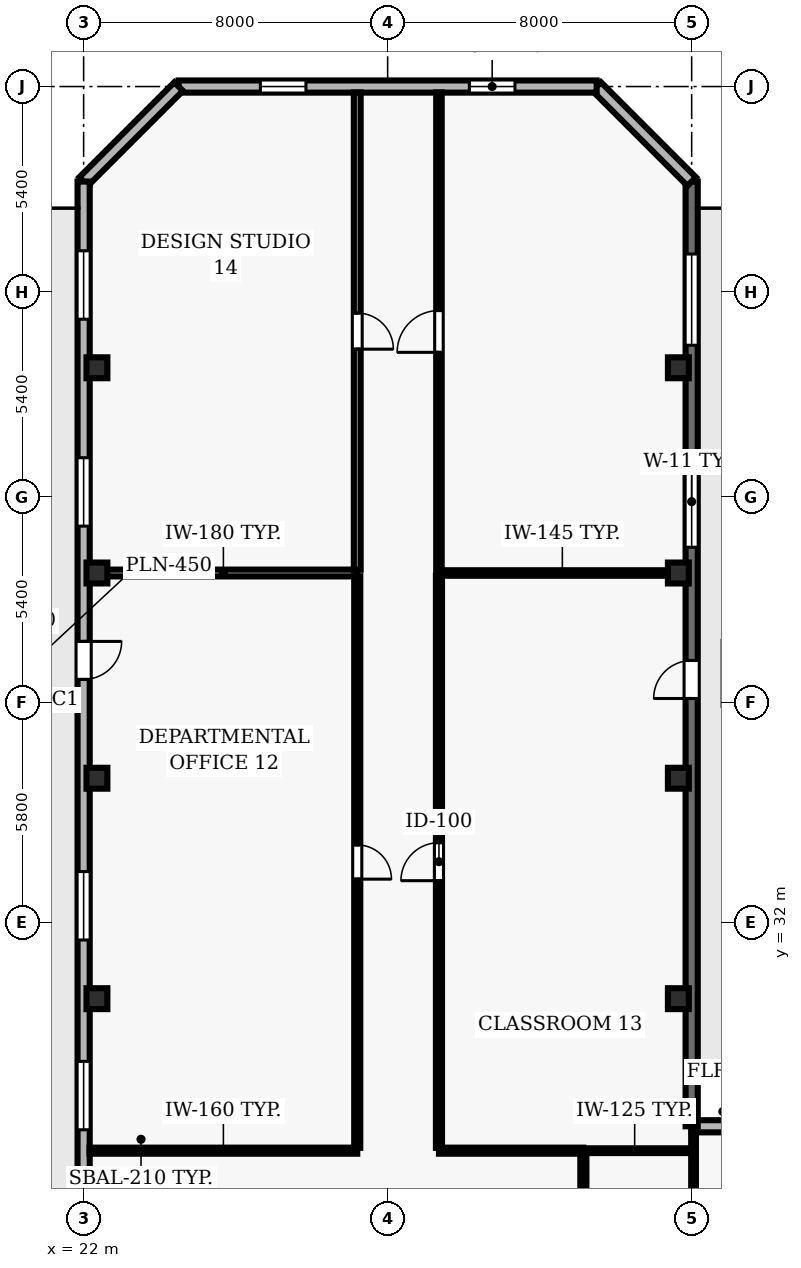
"""IFC4 building model, lengths in metres.
Left out: names, types, materials, properties, quantities, classifications, styles, units other than length and angle.
Written with IfcOpenShell. Run it as: python <this file> out.ifc"""

import sys

from ifc_helpers import new_model, si_unit, direction, frame, frame_2d, origin, origin_2d, place, context, subcontext, project, spatial, rectangle, hollow_rectangle, extrude, element, fill, save


model = new_model("IFC4")
c1 = context("Model", 3, precision=1e-05, world=origin(), true_north=direction((0.0, 1.0)))
c2 = subcontext(c1, "Body", "Model", "MODEL_VIEW")
j1 = project(units=[si_unit("LENGTHUNIT", "METRE"), si_unit("PLANEANGLEUNIT", "RADIAN")], contexts=[c1])
p1 = place(None, origin())
s1 = spatial("IfcSite", under=j1, at=p1, CompositionType="ELEMENT")
p2 = place(p1, origin())
s2 = spatial("IfcBuilding", under=s1, at=p2, CompositionType="ELEMENT")
p3 = place(p2, frame((0.0, 0.0, 62.2)))
s3 = spatial("IfcBuildingStorey", under=s2, at=p3, CompositionType="ELEMENT", Elevation=62.2)
for number, where, z_axis, x_axis in (
    (1, (22.35, 30.0, 0.0), (0.0, 0.0, 1.0), (1.0, 0.0, 0.0)),
    (2, (37.65, 30.0, 0.0), (0.0, 0.0, 1.0), (1.0, 0.0, 0.0)),
    (3, (22.35, 35.8, 0.0), (0.0, 0.0, 1.0), (1.0, 0.0, 0.0)),
    (4, (37.65, 35.8, 0.0), (0.0, 0.0, 1.0), (1.0, 0.0, 0.0)),
    (5, (22.35, 41.2, 0.0), (0.0, 0.0, 1.0), (1.0, 0.0, 0.0)),
    (6, (37.65, 41.2, 0.0), (0.0, 0.0, 1.0), (1.0, 0.0, 0.0)),
    (7, (22.35, 46.6, 0.0), (0.0, 0.0, 1.0), (1.0, 0.0, 0.0)),
    (8, (37.65, 46.6, 0.0), (0.0, 0.0, 1.0), (1.0, 0.0, 0.0)),
):
    element("IfcColumn", number, at=place(p3, frame(where, z_axis=z_axis, x_axis=x_axis)), inside=s3, PredefinedType="COLUMN", context=c2, shape_type="SweptSolid", body=[
        extrude(hollow_rectangle(XDim=0.55, YDim=0.55, WallThickness=0.025, at=origin_2d()), origin(), (0.0, 0.0, 1.0), 3.9),
    ])
p4 = place(p3, frame((49.95, 26.642, 0.0), z_axis=(0.0, 0.0, 1.0), x_axis=(-1.0, 0.0, 0.0)))
e9 = element("IfcWall", 9, at=p4, inside=s3, PredefinedType="SOLIDWALL", context=c2, shape_type="SweptSolid", body=[
    extrude(rectangle(XDim=11.95, YDim=0.32, at=frame_2d((5.975, 0.0))), origin(), (0.0, 0.0, 1.0), 3.69),
])
p5 = place(p4, frame((2.088, 0.0, 0.9)))
e10 = element("IfcOpeningElement", 10, at=p5, cuts=e9, PredefinedType="OPENING", context=c2, shape_type="SweptSolid", body=[
    extrude(rectangle(XDim=1.8, YDim=2.2, at=frame_2d((0.9, 1.1))), frame((0.0, 0.17, 0.0), z_axis=(0.0, -1.0, 0.0), x_axis=(1.0, 0.0, 0.0)), (0.0, 0.0, 1.0), 0.34),
])
p6 = place(p4, frame((8.063, 0.0, 0.9)))
e11 = element("IfcOpeningElement", 11, at=p6, cuts=e9, PredefinedType="OPENING", context=c2, shape_type="SweptSolid", body=[
    extrude(rectangle(XDim=1.8, YDim=2.2, at=frame_2d((0.9, 1.1))), frame((0.0, 0.17, 0.0), z_axis=(0.0, -1.0, 0.0), x_axis=(1.0, 0.0, 0.0)), (0.0, 0.0, 1.0), 0.34),
])
p7 = place(p3, frame((38.0, 26.642, 0.0), z_axis=(0.0, 0.0, 1.0), x_axis=(0.0, 1.0, 0.0)))
e12 = element("IfcWall", 12, at=p7, inside=s3, PredefinedType="SOLIDWALL", context=c2, shape_type="SweptSolid", body=[
    extrude(rectangle(XDim=24.858, YDim=0.32, at=frame_2d((12.429, 0.0))), origin(), (0.0, 0.0, 1.0), 3.69),
])
p8 = place(p7, frame((11.256, 0.0, 0.0)))
e13 = element("IfcOpeningElement", 13, at=p8, cuts=e12, PredefinedType="OPENING", context=c2, shape_type="SweptSolid", body=[
    extrude(rectangle(XDim=1.0, YDim=2.2, at=frame_2d((0.5, 1.1))), frame((0.0, 0.17, 0.0), z_axis=(0.0, -1.0, 0.0), x_axis=(1.0, 0.0, 0.0)), (0.0, 0.0, 1.0), 0.34),
])
p9 = place(p7, frame((15.236, 0.0, 0.9)))
e14 = element("IfcOpeningElement", 14, at=p9, cuts=e12, PredefinedType="OPENING", context=c2, shape_type="SweptSolid", body=[
    extrude(rectangle(XDim=2.4, YDim=2.2, at=frame_2d((1.2, 1.1))), frame((0.0, 0.17, 0.0), z_axis=(0.0, -1.0, 0.0), x_axis=(1.0, 0.0, 0.0)), (0.0, 0.0, 1.0), 0.34),
])
p10 = place(p7, frame((20.551, 0.0, 0.9)))
e15 = element("IfcOpeningElement", 15, at=p10, cuts=e12, PredefinedType="OPENING", context=c2, shape_type="SweptSolid", body=[
    extrude(rectangle(XDim=2.4, YDim=2.2, at=frame_2d((1.2, 1.1))), frame((0.0, 0.17, 0.0), z_axis=(0.0, -1.0, 0.0), x_axis=(1.0, 0.0, 0.0)), (0.0, 0.0, 1.0), 0.34),
])
p11 = place(p3, frame((38.0, 51.5, 0.0), z_axis=(0.0, 0.0, 1.0), x_axis=(-0.707106781187, 0.707106781187, 0.0)))
e16 = element("IfcWall", 16, at=p11, inside=s3, PredefinedType="SOLIDWALL", context=c2, shape_type="SweptSolid", body=[
    extrude(rectangle(XDim=3.536, YDim=0.32, at=frame_2d((1.768, 0.0))), origin(), (0.0, 0.0, 1.0), 3.69),
])
p12 = place(p3, frame((35.5, 54.0, 0.0), z_axis=(0.0, 0.0, 1.0), x_axis=(-1.0, 0.0, 0.0)))
e17 = element("IfcWall", 17, at=p12, inside=s3, PredefinedType="SOLIDWALL", context=c2, shape_type="SweptSolid", body=[
    extrude(rectangle(XDim=11.0, YDim=0.32, at=frame_2d((5.5, 0.0))), origin(), (0.0, 0.0, 1.0), 3.69),
])
p13 = place(p12, frame((2.15, 0.0, 0.9)))
e18 = element("IfcOpeningElement", 18, at=p13, cuts=e17, PredefinedType="OPENING", context=c2, shape_type="SweptSolid", body=[
    extrude(rectangle(XDim=1.2, YDim=1.6, at=frame_2d((0.6, 0.8))), frame((0.0, 0.17, 0.0), z_axis=(0.0, -1.0, 0.0), x_axis=(1.0, 0.0, 0.0)), (0.0, 0.0, 1.0), 0.34),
])
p14 = place(p12, frame((7.65, 0.0, 0.9)))
e19 = element("IfcOpeningElement", 19, at=p14, cuts=e17, PredefinedType="OPENING", context=c2, shape_type="SweptSolid", body=[
    extrude(rectangle(XDim=1.2, YDim=1.6, at=frame_2d((0.6, 0.8))), frame((0.0, 0.17, 0.0), z_axis=(0.0, -1.0, 0.0), x_axis=(1.0, 0.0, 0.0)), (0.0, 0.0, 1.0), 0.34),
])
p15 = place(p3, frame((24.5, 54.0, 0.0), z_axis=(0.0, 0.0, 1.0), x_axis=(-0.707106781187, -0.707106781187, 0.0)))
e20 = element("IfcWall", 20, at=p15, inside=s3, PredefinedType="SOLIDWALL", context=c2, shape_type="SweptSolid", body=[
    extrude(rectangle(XDim=3.536, YDim=0.32, at=frame_2d((1.768, 0.0))), origin(), (0.0, 0.0, 1.0), 3.69),
])
p16 = place(p3, frame((22.0, 51.5, 0.0), z_axis=(0.0, 0.0, 1.0), x_axis=(0.0, -1.0, 0.0)))
e21 = element("IfcWall", 21, at=p16, inside=s3, PredefinedType="SOLIDWALL", context=c2, shape_type="SweptSolid", body=[
    extrude(rectangle(XDim=49.0, YDim=0.32, at=frame_2d((24.5, 0.0))), origin(), (0.0, 0.0, 1.0), 3.69),
])
p17 = place(p16, frame((12.1, 0.0, 0.0)))
e22 = element("IfcOpeningElement", 22, at=p17, cuts=e21, PredefinedType="OPENING", context=c2, shape_type="SweptSolid", body=[
    extrude(rectangle(XDim=1.0, YDim=2.2, at=frame_2d((0.5, 1.1))), frame((0.0, 0.17, 0.0), z_axis=(0.0, -1.0, 0.0), x_axis=(1.0, 0.0, 0.0)), (0.0, 0.0, 1.0), 0.34),
])
p18 = place(p16, frame((1.822, 0.0, 0.9)))
e23 = element("IfcOpeningElement", 23, at=p18, cuts=e21, PredefinedType="OPENING", context=c2, shape_type="SweptSolid", body=[
    extrude(rectangle(XDim=1.8, YDim=1.6, at=frame_2d((0.9, 0.8))), frame((0.0, 0.17, 0.0), z_axis=(0.0, -1.0, 0.0), x_axis=(1.0, 0.0, 0.0)), (0.0, 0.0, 1.0), 0.34),
])
p19 = place(p16, frame((7.267, 0.0, 0.9)))
e24 = element("IfcOpeningElement", 24, at=p19, cuts=e21, PredefinedType="OPENING", context=c2, shape_type="SweptSolid", body=[
    extrude(rectangle(XDim=1.8, YDim=1.6, at=frame_2d((0.9, 0.8))), frame((0.0, 0.17, 0.0), z_axis=(0.0, -1.0, 0.0), x_axis=(1.0, 0.0, 0.0)), (0.0, 0.0, 1.0), 0.34),
])
p20 = place(p16, frame((18.156, 0.0, 0.9)))
e25 = element("IfcOpeningElement", 25, at=p20, cuts=e21, PredefinedType="OPENING", context=c2, shape_type="SweptSolid", body=[
    extrude(rectangle(XDim=1.8, YDim=1.6, at=frame_2d((0.9, 0.8))), frame((0.0, 0.17, 0.0), z_axis=(0.0, -1.0, 0.0), x_axis=(1.0, 0.0, 0.0)), (0.0, 0.0, 1.0), 0.34),
])
p21 = place(p16, frame((23.15, 0.0, 0.9)))
e26 = element("IfcOpeningElement", 26, at=p21, cuts=e21, PredefinedType="OPENING", context=c2, shape_type="SweptSolid", body=[
    extrude(rectangle(XDim=1.8, YDim=1.6, at=frame_2d((0.9, 0.8))), frame((0.0, 0.17, 0.0), z_axis=(0.0, -1.0, 0.0), x_axis=(1.0, 0.0, 0.0)), (0.0, 0.0, 1.0), 0.34),
])
p22 = place(p16, frame((29.044, 0.0, 0.9)))
e27 = element("IfcOpeningElement", 27, at=p22, cuts=e21, PredefinedType="OPENING", context=c2, shape_type="SweptSolid", body=[
    extrude(rectangle(XDim=1.8, YDim=1.6, at=frame_2d((0.9, 0.8))), frame((0.0, 0.17, 0.0), z_axis=(0.0, -1.0, 0.0), x_axis=(1.0, 0.0, 0.0)), (0.0, 0.0, 1.0), 0.34),
])
p23 = place(p16, frame((34.039, 0.0, 0.9)))
e28 = element("IfcOpeningElement", 28, at=p23, cuts=e21, PredefinedType="OPENING", context=c2, shape_type="SweptSolid", body=[
    extrude(rectangle(XDim=1.8, YDim=1.6, at=frame_2d((0.9, 0.8))), frame((0.0, 0.17, 0.0), z_axis=(0.0, -1.0, 0.0), x_axis=(1.0, 0.0, 0.0)), (0.0, 0.0, 1.0), 0.34),
])
p24 = place(p16, frame((39.933, 0.0, 0.9)))
e29 = element("IfcOpeningElement", 29, at=p24, cuts=e21, PredefinedType="OPENING", context=c2, shape_type="SweptSolid", body=[
    extrude(rectangle(XDim=1.8, YDim=1.6, at=frame_2d((0.9, 0.8))), frame((0.0, 0.17, 0.0), z_axis=(0.0, -1.0, 0.0), x_axis=(1.0, 0.0, 0.0)), (0.0, 0.0, 1.0), 0.34),
])
p25 = place(p3, frame((29.2, 26.0, 0.0), z_axis=(0.0, 0.0, 1.0), x_axis=(-1.0, 0.0, 0.0)))
e30 = element("IfcWall", 30, at=p25, inside=s3, PredefinedType="PARTITIONING", context=c2, shape_type="SweptSolid", body=[
    extrude(rectangle(XDim=7.045, YDim=0.16, at=frame_2d((3.522, 0.0))), origin(), (0.0, 0.0, 1.0), 3.69),
])
p26 = place(p3, frame((29.2, 41.2, 0.0), z_axis=(0.0, 0.0, 1.0), x_axis=(-1.0, 0.0, 0.0)))
e31 = element("IfcWall", 31, at=p26, inside=s3, PredefinedType="PARTITIONING", context=c2, shape_type="SweptSolid", body=[
    extrude(rectangle(XDim=7.045, YDim=0.18, at=frame_2d((3.522, 0.0))), origin(), (0.0, 0.0, 1.0), 2.995),
])
p27 = place(p3, frame((35.15, 26.0, 0.0), z_axis=(0.0, 0.0, 1.0), x_axis=(-1.0, 0.0, 0.0)))
e32 = element("IfcWall", 32, at=p27, inside=s3, PredefinedType="PARTITIONING", context=c2, shape_type="SweptSolid", body=[
    extrude(rectangle(XDim=3.8, YDim=0.16, at=frame_2d((1.9, 0.0))), origin(), (0.0, 0.0, 1.0), 3.69),
])
p28 = place(p3, frame((35.15, 26.0, 0.0), z_axis=(0.0, 0.0, 1.0), x_axis=(1.0, 0.0, 0.0)))
e33 = element("IfcWall", 33, at=p28, inside=s3, PredefinedType="PARTITIONING", context=c2, shape_type="SweptSolid", body=[
    extrude(rectangle(XDim=2.7, YDim=0.125, at=frame_2d((1.35, 0.0))), origin(), (0.0, 0.0, 1.0), 3.69),
])
p29 = place(p3, frame((37.845, 41.2, 0.0), z_axis=(0.0, 0.0, 1.0), x_axis=(-1.0, 0.0, 0.0)))
e34 = element("IfcWall", 34, at=p29, inside=s3, PredefinedType="PARTITIONING", context=c2, shape_type="SweptSolid", body=[
    extrude(rectangle(XDim=6.495, YDim=0.145, at=frame_2d((3.248, 0.0))), origin(), (0.0, 0.0, 1.0), 2.995),
])
p30 = place(p3, frame((29.2, 41.115, 0.0), z_axis=(0.0, 0.0, 1.0), x_axis=(0.0, -1.0, 0.0)))
e35 = element("IfcWall", 35, at=p30, inside=s3, PredefinedType="PARTITIONING", context=c2, shape_type="SweptSolid", body=[
    extrude(rectangle(XDim=15.04, YDim=0.16, at=frame_2d((7.52, 0.0))), origin(), (0.0, 0.0, 1.0), 3.69),
])
p31 = place(p30, frame((7.07, 0.0, 0.0)))
e36 = element("IfcOpeningElement", 36, at=p31, cuts=e35, PredefinedType="OPENING", context=c2, shape_type="SweptSolid", body=[
    extrude(rectangle(XDim=0.9, YDim=2.1, at=frame_2d((0.45, 1.05))), frame((0.0, 0.09, 0.0), z_axis=(0.0, -1.0, 0.0), x_axis=(1.0, 0.0, 0.0)), (0.0, 0.0, 1.0), 0.18),
])
p32 = place(p3, frame((29.2, 53.845, 0.0), z_axis=(0.0, 0.0, 1.0), x_axis=(0.0, -1.0, 0.0)))
e37 = element("IfcWall", 37, at=p32, inside=s3, PredefinedType="PARTITIONING", context=c2, shape_type="SweptSolid", body=[
    extrude(rectangle(XDim=12.56, YDim=0.18, at=frame_2d((6.28, 0.0))), origin(), (0.0, 0.0, 1.0), 3.69),
])
p33 = place(p32, frame((5.805, 0.0, 0.0)))
e38 = element("IfcOpeningElement", 38, at=p33, cuts=e37, PredefinedType="OPENING", context=c2, shape_type="SweptSolid", body=[
    extrude(rectangle(XDim=0.95, YDim=2.1, at=frame_2d((0.475, 1.05))), frame((0.0, 0.1, 0.0), z_axis=(0.0, -1.0, 0.0), x_axis=(1.0, 0.0, 0.0)), (0.0, 0.0, 1.0), 0.2),
])
p34 = place(p3, frame((31.35, 26.075, 0.0), z_axis=(0.0, 0.0, 1.0), x_axis=(0.0, 1.0, 0.0)))
e39 = element("IfcWall", 39, at=p34, inside=s3, PredefinedType="PARTITIONING", context=c2, shape_type="SweptSolid", body=[
    extrude(rectangle(XDim=15.058, YDim=0.16, at=frame_2d((7.529, 0.0))), origin(), (0.0, 0.0, 1.0), 3.69),
])
p35 = place(p34, frame((7.029, 0.0, 0.0)))
e40 = element("IfcOpeningElement", 40, at=p35, cuts=e39, PredefinedType="OPENING", context=c2, shape_type="SweptSolid", body=[
    extrude(rectangle(XDim=1.0, YDim=2.1, at=frame_2d((0.5, 1.05))), frame((0.0, 0.09, 0.0), z_axis=(0.0, -1.0, 0.0), x_axis=(1.0, 0.0, 0.0)), (0.0, 0.0, 1.0), 0.18),
])
p36 = place(p3, frame((31.35, 41.268, 0.0), z_axis=(0.0, 0.0, 1.0), x_axis=(0.0, 1.0, 0.0)))
e41 = element("IfcWall", 41, at=p36, inside=s3, PredefinedType="PARTITIONING", context=c2, shape_type="SweptSolid", body=[
    extrude(rectangle(XDim=12.577, YDim=0.145, at=frame_2d((6.289, 0.0))), origin(), (0.0, 0.0, 1.0), 3.69),
])
p37 = place(p36, frame((5.738, 0.0, 0.0)))
e42 = element("IfcOpeningElement", 42, at=p37, cuts=e41, PredefinedType="OPENING", context=c2, shape_type="SweptSolid", body=[
    extrude(rectangle(XDim=1.1, YDim=2.15, at=frame_2d((0.55, 1.075))), frame((0.0, 0.083, 0.0), z_axis=(0.0, -1.0, 0.0), x_axis=(1.0, 0.0, 0.0)), (0.0, 0.0, 1.0), 0.165),
])
p38 = place(p3, frame((35.15, 24.07, 0.0), z_axis=(0.0, 0.0, 1.0), x_axis=(0.0, 1.0, 0.0)))
e43 = element("IfcWall", 43, at=p38, inside=s3, PredefinedType="PARTITIONING", context=c2, shape_type="SweptSolid", body=[
    extrude(rectangle(XDim=1.855, YDim=0.16, at=frame_2d((0.927, 0.0))), origin(), (0.0, 0.0, 1.0), 3.69),
])
p39 = place(p3, frame((38.05, 26.487, 0.0), z_axis=(0.0, 0.0, 1.0), x_axis=(0.0, -1.0, 0.0)))
e44 = element("IfcWall", 44, at=p39, inside=s3, PredefinedType="PARTITIONING", context=c2, shape_type="SweptSolid", body=[
    extrude(rectangle(XDim=2.437, YDim=0.125, at=frame_2d((1.219, 0.0))), origin(), (0.0, 0.0, 1.0), 2.995),
])
p40 = place(p8, origin())
e45 = element("IfcDoor", 45, at=p40, inside=s3, OperationType="SINGLE_SWING_LEFT", PredefinedType="DOOR", context=c2, shape_type="SweptSolid", body=[
    extrude(rectangle(XDim=1.0, YDim=2.2, at=frame_2d((0.5, 1.1))), frame((0.0, 0.025, 0.0), z_axis=(0.0, -1.0, 0.0), x_axis=(1.0, 0.0, 0.0)), (0.0, 0.0, 1.0), 0.05),
])
fill(e13, e45)
p41 = place(p9, origin())
e46 = element("IfcWindow", 46, at=p41, inside=s3, PartitioningType="SINGLE_PANEL", PredefinedType="WINDOW", context=c2, shape_type="SweptSolid", body=[
    extrude(rectangle(XDim=2.4, YDim=2.2, at=frame_2d((1.2, 1.1))), frame((0.0, 0.03, 0.0), z_axis=(0.0, -1.0, 0.0), x_axis=(1.0, 0.0, 0.0)), (0.0, 0.0, 1.0), 0.06),
])
fill(e14, e46)
p42 = place(p10, origin())
e47 = element("IfcWindow", 47, at=p42, inside=s3, PartitioningType="SINGLE_PANEL", PredefinedType="WINDOW", context=c2, shape_type="SweptSolid", body=[
    extrude(rectangle(XDim=2.4, YDim=2.2, at=frame_2d((1.2, 1.1))), frame((0.0, 0.03, 0.0), z_axis=(0.0, -1.0, 0.0), x_axis=(1.0, 0.0, 0.0)), (0.0, 0.0, 1.0), 0.06),
])
fill(e15, e47)
p43 = place(p13, origin())
e48 = element("IfcWindow", 48, at=p43, inside=s3, PartitioningType="SINGLE_PANEL", PredefinedType="WINDOW", context=c2, shape_type="SweptSolid", body=[
    extrude(rectangle(XDim=1.2, YDim=1.6, at=frame_2d((0.6, 0.8))), frame((0.0, 0.03, 0.0), z_axis=(0.0, -1.0, 0.0), x_axis=(1.0, 0.0, 0.0)), (0.0, 0.0, 1.0), 0.06),
])
fill(e18, e48)
p44 = place(p14, origin())
e49 = element("IfcWindow", 49, at=p44, inside=s3, PartitioningType="SINGLE_PANEL", PredefinedType="WINDOW", context=c2, shape_type="SweptSolid", body=[
    extrude(rectangle(XDim=1.2, YDim=1.6, at=frame_2d((0.6, 0.8))), frame((0.0, 0.03, 0.0), z_axis=(0.0, -1.0, 0.0), x_axis=(1.0, 0.0, 0.0)), (0.0, 0.0, 1.0), 0.06),
])
fill(e19, e49)
p45 = place(p17, origin())
e50 = element("IfcDoor", 50, at=p45, inside=s3, OperationType="SINGLE_SWING_LEFT", PredefinedType="DOOR", context=c2, shape_type="SweptSolid", body=[
    extrude(rectangle(XDim=1.0, YDim=2.2, at=frame_2d((0.5, 1.1))), frame((0.0, 0.025, 0.0), z_axis=(0.0, -1.0, 0.0), x_axis=(1.0, 0.0, 0.0)), (0.0, 0.0, 1.0), 0.05),
])
fill(e22, e50)
p46 = place(p18, origin())
e51 = element("IfcWindow", 51, at=p46, inside=s3, PartitioningType="SINGLE_PANEL", PredefinedType="WINDOW", context=c2, shape_type="SweptSolid", body=[
    extrude(rectangle(XDim=1.8, YDim=1.6, at=frame_2d((0.9, 0.8))), frame((0.0, 0.03, 0.0), z_axis=(0.0, -1.0, 0.0), x_axis=(1.0, 0.0, 0.0)), (0.0, 0.0, 1.0), 0.06),
])
fill(e23, e51)
p47 = place(p19, origin())
e52 = element("IfcWindow", 52, at=p47, inside=s3, PartitioningType="SINGLE_PANEL", PredefinedType="WINDOW", context=c2, shape_type="SweptSolid", body=[
    extrude(rectangle(XDim=1.8, YDim=1.6, at=frame_2d((0.9, 0.8))), frame((0.0, 0.03, 0.0), z_axis=(0.0, -1.0, 0.0), x_axis=(1.0, 0.0, 0.0)), (0.0, 0.0, 1.0), 0.06),
])
fill(e24, e52)
p48 = place(p20, origin())
e53 = element("IfcWindow", 53, at=p48, inside=s3, PartitioningType="SINGLE_PANEL", PredefinedType="WINDOW", context=c2, shape_type="SweptSolid", body=[
    extrude(rectangle(XDim=1.8, YDim=1.6, at=frame_2d((0.9, 0.8))), frame((0.0, 0.03, 0.0), z_axis=(0.0, -1.0, 0.0), x_axis=(1.0, 0.0, 0.0)), (0.0, 0.0, 1.0), 0.06),
])
fill(e25, e53)
p49 = place(p21, origin())
e54 = element("IfcWindow", 54, at=p49, inside=s3, PartitioningType="SINGLE_PANEL", PredefinedType="WINDOW", context=c2, shape_type="SweptSolid", body=[
    extrude(rectangle(XDim=1.8, YDim=1.6, at=frame_2d((0.9, 0.8))), frame((0.0, 0.03, 0.0), z_axis=(0.0, -1.0, 0.0), x_axis=(1.0, 0.0, 0.0)), (0.0, 0.0, 1.0), 0.06),
])
fill(e26, e54)
p50 = place(p31, origin())
e55 = element("IfcDoor", 55, at=p50, inside=s3, OperationType="SINGLE_SWING_RIGHT", PredefinedType="DOOR", context=c2, shape_type="SweptSolid", body=[
    extrude(rectangle(XDim=0.9, YDim=2.1, at=frame_2d((0.45, 1.05))), frame((0.0, 0.025, 0.0), z_axis=(0.0, -1.0, 0.0), x_axis=(1.0, 0.0, 0.0)), (0.0, 0.0, 1.0), 0.05),
])
fill(e36, e55)
p51 = place(p35, origin())
e56 = element("IfcDoor", 56, at=p51, inside=s3, OperationType="SINGLE_SWING_LEFT", PredefinedType="DOOR", context=c2, shape_type="SweptSolid", body=[
    extrude(rectangle(XDim=1.0, YDim=2.1, at=frame_2d((0.5, 1.05))), frame((0.0, 0.025, 0.0), z_axis=(0.0, -1.0, 0.0), x_axis=(1.0, 0.0, 0.0)), (0.0, 0.0, 1.0), 0.05),
])
fill(e40, e56)
p52 = place(p33, origin())
e57 = element("IfcDoor", 57, at=p52, inside=s3, OperationType="SINGLE_SWING_RIGHT", PredefinedType="DOOR", context=c2, shape_type="SweptSolid", body=[
    extrude(rectangle(XDim=0.95, YDim=2.1, at=frame_2d((0.475, 1.05))), frame((0.0, 0.025, 0.0), z_axis=(0.0, -1.0, 0.0), x_axis=(1.0, 0.0, 0.0)), (0.0, 0.0, 1.0), 0.05),
])
fill(e38, e57)
p53 = place(p37, origin())
e58 = element("IfcDoor", 58, at=p53, inside=s3, OperationType="SINGLE_SWING_LEFT", PredefinedType="DOOR", context=c2, shape_type="SweptSolid", body=[
    extrude(rectangle(XDim=1.1, YDim=2.15, at=frame_2d((0.55, 1.075))), frame((0.0, 0.025, 0.0), z_axis=(0.0, -1.0, 0.0), x_axis=(1.0, 0.0, 0.0)), (0.0, 0.0, 1.0), 0.05),
])
fill(e42, e58)
save(model, sys.argv[1])
